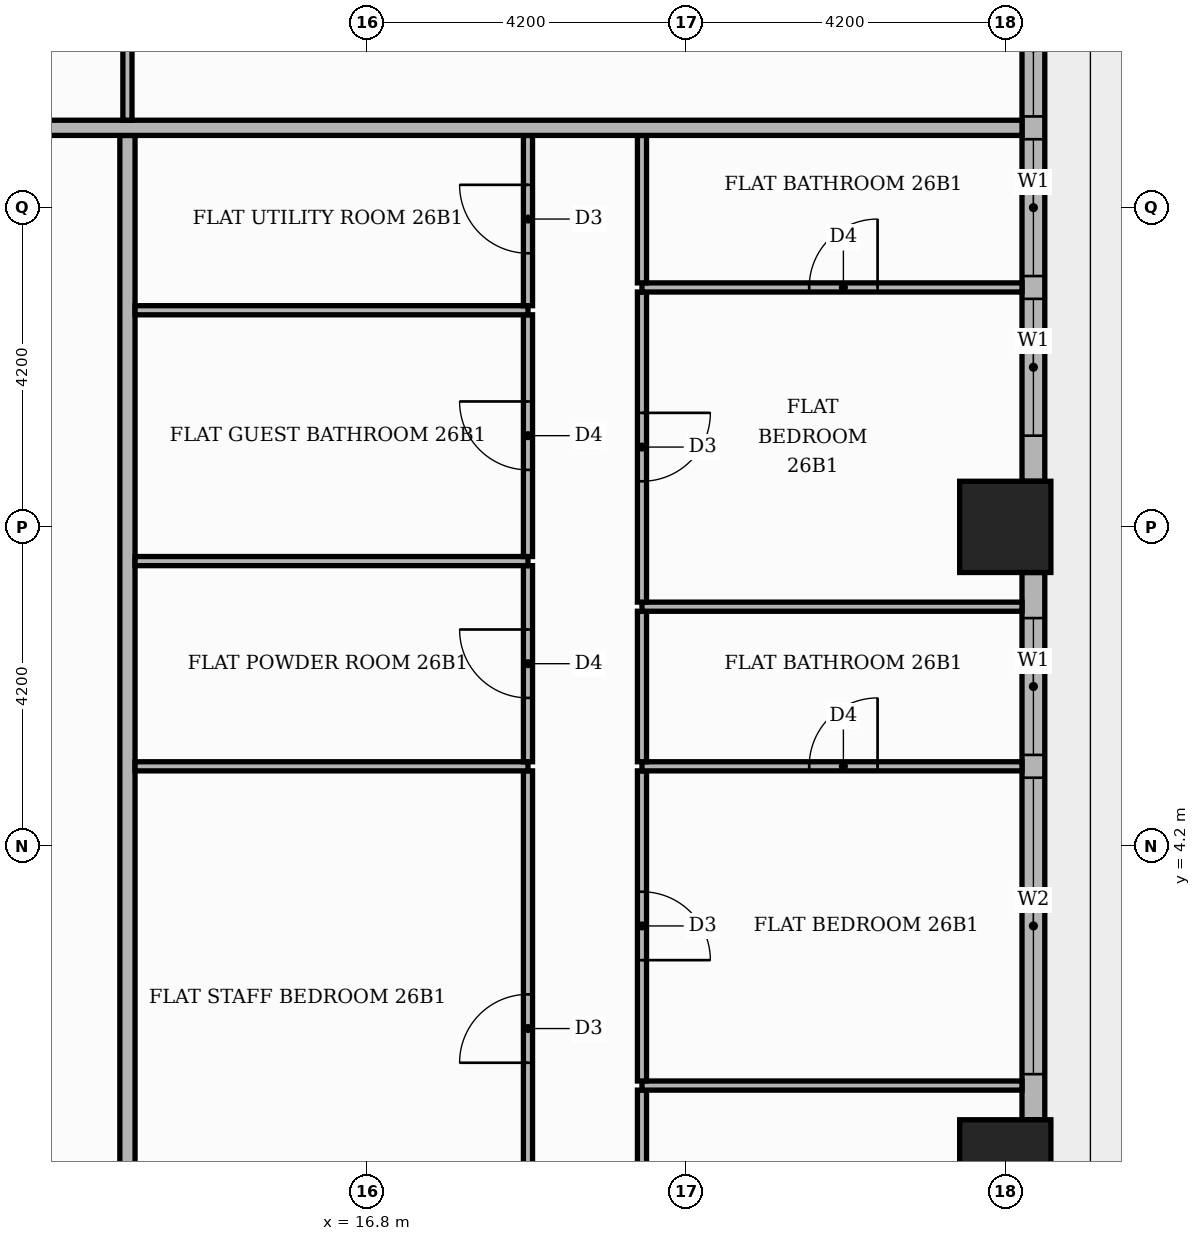
"""IFC4 building model, lengths in metres.
Left out: names, types, materials, properties, quantities, classifications, styles, units other than length and angle.
Written with IfcOpenShell. Run it as: python <this file> out.ifc"""

import sys

from ifc_helpers import new_model, si_unit, direction, frame, frame_2d, origin, origin_2d, place, context, subcontext, project, spatial, rectangle, extrude, element, fill, save


model = new_model("IFC4")
c1 = context("Model", 3, precision=1e-05, world=origin(), true_north=direction((0.0, 1.0)))
c2 = subcontext(c1, "Body", "Model", "MODEL_VIEW")
j1 = project(units=[si_unit("LENGTHUNIT", "METRE"), si_unit("PLANEANGLEUNIT", "RADIAN")], contexts=[c1])
p1 = place(None, origin())
s1 = spatial("IfcSite", under=j1, at=p1, CompositionType="ELEMENT")
p2 = place(p1, origin())
s2 = spatial("IfcBuilding", under=s1, at=p2, CompositionType="ELEMENT")
p3 = place(p2, frame((0.0, 0.0, 110.4)))
s3 = spatial("IfcBuildingStorey", under=s2, at=p3, CompositionType="ELEMENT", Elevation=110.4)
for number, where, z_axis, x_axis in (
    (1, (25.2, 0.0, 0.0), (0.0, 0.0, 1.0), (1.0, 0.0, 0.0)),
    (2, (25.2, 8.4, 0.0), (0.0, 0.0, 1.0), (1.0, 0.0, 0.0)),
):
    element("IfcColumn", number, at=place(p3, frame(where, z_axis=z_axis, x_axis=x_axis)), inside=s3, PredefinedType="COLUMN", context=c2, shape_type="SweptSolid", body=[
        extrude(rectangle(XDim=1.2, YDim=1.2, at=origin_2d()), origin(), (0.0, 0.0, 1.0), 3.9),
    ])
p4 = place(p3, frame((25.57, 0.6, 0.0), z_axis=(0.0, 0.0, 1.0), x_axis=(0.0, 1.0, 0.0)))
e3 = element("IfcWall", 3, at=p4, inside=s3, PredefinedType="STANDARD", context=c2, shape_type="SweptSolid", body=[
    extrude(rectangle(XDim=7.2, YDim=0.3, at=frame_2d((3.6, 0.0))), origin(), (0.0, 0.0, 1.0), 3.48),
])
p5 = place(p4, frame((0.6, 0.0, 0.9)))
e4 = element("IfcOpeningElement", 4, at=p5, cuts=e3, PredefinedType="OPENING", context=c2, shape_type="SweptSolid", body=[
    extrude(rectangle(XDim=3.9, YDim=2.1, at=frame_2d((1.95, 1.05))), frame((0.0, 0.16, 0.0), z_axis=(0.0, -1.0, 0.0), x_axis=(1.0, 0.0, 0.0)), (0.0, 0.0, 1.0), 0.32),
])
p6 = place(p4, frame((4.8, 0.0, 0.9)))
e5 = element("IfcOpeningElement", 5, at=p6, cuts=e3, PredefinedType="OPENING", context=c2, shape_type="SweptSolid", body=[
    extrude(rectangle(XDim=1.8, YDim=2.1, at=frame_2d((0.9, 1.05))), frame((0.0, 0.16, 0.0), z_axis=(0.0, -1.0, 0.0), x_axis=(1.0, 0.0, 0.0)), (0.0, 0.0, 1.0), 0.32),
])
p7 = place(p3, frame((25.57, 9.0, 0.0), z_axis=(0.0, 0.0, 1.0), x_axis=(0.0, 1.0, 0.0)))
e6 = element("IfcWall", 6, at=p7, inside=s3, PredefinedType="STANDARD", context=c2, shape_type="SweptSolid", body=[
    extrude(rectangle(XDim=7.2, YDim=0.3, at=frame_2d((3.6, 0.0))), origin(), (0.0, 0.0, 1.0), 3.48),
])
p8 = place(p7, frame((0.6, 0.0, 0.9)))
e7 = element("IfcOpeningElement", 7, at=p8, cuts=e6, PredefinedType="OPENING", context=c2, shape_type="SweptSolid", body=[
    extrude(rectangle(XDim=1.8, YDim=2.1, at=frame_2d((0.9, 1.05))), frame((0.0, 0.16, 0.0), z_axis=(0.0, -1.0, 0.0), x_axis=(1.0, 0.0, 0.0)), (0.0, 0.0, 1.0), 0.32),
])
p9 = place(p7, frame((2.7, 0.0, 0.9)))
e8 = element("IfcOpeningElement", 8, at=p9, cuts=e6, PredefinedType="OPENING", context=c2, shape_type="SweptSolid", body=[
    extrude(rectangle(XDim=1.8, YDim=2.1, at=frame_2d((0.9, 1.05))), frame((0.0, 0.16, 0.0), z_axis=(0.0, -1.0, 0.0), x_axis=(1.0, 0.0, 0.0)), (0.0, 0.0, 1.0), 0.32),
])
p10 = place(p7, frame((4.8, 0.0, 0.9)))
e9 = element("IfcOpeningElement", 9, at=p10, cuts=e6, PredefinedType="OPENING", context=c2, shape_type="SweptSolid", body=[
    extrude(rectangle(XDim=1.8, YDim=2.1, at=frame_2d((0.9, 1.05))), frame((0.0, 0.16, 0.0), z_axis=(0.0, -1.0, 0.0), x_axis=(1.0, 0.0, 0.0)), (0.0, 0.0, 1.0), 0.32),
])
p11 = place(p3, frame((13.65, -13.55, 0.0), z_axis=(0.0, 0.0, 1.0), x_axis=(0.0, 1.0, 0.0)))
e10 = element("IfcWall", 10, at=p11, inside=s3, PredefinedType="PARTITIONING", context=c2, shape_type="SweptSolid", body=[
    extrude(rectangle(XDim=27.1, YDim=0.2, at=frame_2d((13.55, 0.0))), origin(), (0.0, 0.0, 1.0), 3.48),
])
p12 = place(p11, frame((2.5, 0.0, 0.0)))
e11 = element("IfcOpeningElement", 11, at=p12, cuts=e10, PredefinedType="OPENING", context=c2, shape_type="SweptSolid", body=[
    extrude(rectangle(XDim=1.1, YDim=2.4, at=frame_2d((0.55, 1.2))), frame((0.0, 0.11, 0.0), z_axis=(0.0, -1.0, 0.0), x_axis=(1.0, 0.0, 0.0)), (0.0, 0.0, 1.0), 0.22),
])
p13 = place(p3, frame((20.42, -3.09, 0.0), z_axis=(0.0, 0.0, 1.0), x_axis=(0.0, 1.0, 0.0)))
e12 = element("IfcWall", 12, at=p13, inside=s3, PredefinedType="PARTITIONING", context=c2, shape_type="SweptSolid", body=[
    extrude(rectangle(XDim=4.08, YDim=0.12, at=frame_2d((2.04, 0.0))), origin(), (0.0, 0.0, 1.0), 3.48),
])
p14 = place(p13, frame((1.59, 0.0, 0.0)))
e13 = element("IfcOpeningElement", 13, at=p14, cuts=e12, PredefinedType="OPENING", context=c2, shape_type="SweptSolid", body=[
    extrude(rectangle(XDim=0.9, YDim=2.1, at=frame_2d((0.45, 1.05))), frame((0.0, 0.07, 0.0), z_axis=(0.0, -1.0, 0.0), x_axis=(1.0, 0.0, 0.0)), (0.0, 0.0, 1.0), 0.14),
])
p15 = place(p3, frame((18.92, -1.59, 0.0), z_axis=(0.0, 0.0, 1.0), x_axis=(0.0, 1.0, 0.0)))
e14 = element("IfcWall", 14, at=p15, inside=s3, PredefinedType="PARTITIONING", context=c2, shape_type="SweptSolid", body=[
    extrude(rectangle(XDim=6.78, YDim=0.12, at=frame_2d((3.39, 0.0))), origin(), (0.0, 0.0, 1.0), 3.48),
])
p16 = place(p15, frame((2.94, 0.0, 0.0)))
e15 = element("IfcOpeningElement", 15, at=p16, cuts=e14, PredefinedType="OPENING", context=c2, shape_type="SweptSolid", body=[
    extrude(rectangle(XDim=0.9, YDim=2.1, at=frame_2d((0.45, 1.05))), frame((0.0, 0.07, 0.0), z_axis=(0.0, -1.0, 0.0), x_axis=(1.0, 0.0, 0.0)), (0.0, 0.0, 1.0), 0.14),
])
p17 = place(p3, frame((20.42, 1.05, 0.0), z_axis=(0.0, 0.0, 1.0), x_axis=(1.0, 0.0, 0.0)))
e16 = element("IfcWall", 16, at=p17, inside=s3, PredefinedType="PARTITIONING", context=c2, shape_type="SweptSolid", body=[
    extrude(rectangle(XDim=5.0, YDim=0.12, at=frame_2d((2.5, 0.0))), origin(), (0.0, 0.0, 1.0), 3.48),
])
p18 = place(p3, frame((20.42, 1.11, 0.0), z_axis=(0.0, 0.0, 1.0), x_axis=(0.0, 1.0, 0.0)))
e17 = element("IfcWall", 17, at=p18, inside=s3, PredefinedType="PARTITIONING", context=c2, shape_type="SweptSolid", body=[
    extrude(rectangle(XDim=4.08, YDim=0.12, at=frame_2d((2.04, 0.0))), origin(), (0.0, 0.0, 1.0), 3.48),
])
p19 = place(p18, frame((1.59, 0.0, 0.0)))
e18 = element("IfcOpeningElement", 18, at=p19, cuts=e17, PredefinedType="OPENING", context=c2, shape_type="SweptSolid", body=[
    extrude(rectangle(XDim=0.9, YDim=2.1, at=frame_2d((0.45, 1.05))), frame((0.0, 0.07, 0.0), z_axis=(0.0, -1.0, 0.0), x_axis=(1.0, 0.0, 0.0)), (0.0, 0.0, 1.0), 0.14),
])
p20 = place(p3, frame((13.75, 5.25, 0.0), z_axis=(0.0, 0.0, 1.0), x_axis=(1.0, 0.0, 0.0)))
e19 = element("IfcWall", 19, at=p20, inside=s3, PredefinedType="PARTITIONING", context=c2, shape_type="SweptSolid", body=[
    extrude(rectangle(XDim=5.17, YDim=0.12, at=frame_2d((2.585, 0.0))), origin(), (0.0, 0.0, 1.0), 3.48),
])
p21 = place(p3, frame((20.42, 5.25, 0.0), z_axis=(0.0, 0.0, 1.0), x_axis=(1.0, 0.0, 0.0)))
e20 = element("IfcWall", 20, at=p21, inside=s3, PredefinedType="PARTITIONING", context=c2, shape_type="SweptSolid", body=[
    extrude(rectangle(XDim=5.0, YDim=0.12, at=frame_2d((2.5, 0.0))), origin(), (0.0, 0.0, 1.0), 3.48),
])
p22 = place(p21, frame((2.2, 0.0, 0.0)))
e21 = element("IfcOpeningElement", 21, at=p22, cuts=e20, PredefinedType="OPENING", context=c2, shape_type="SweptSolid", body=[
    extrude(rectangle(XDim=0.9, YDim=2.1, at=frame_2d((0.45, 1.05))), frame((0.0, 0.07, 0.0), z_axis=(0.0, -1.0, 0.0), x_axis=(1.0, 0.0, 0.0)), (0.0, 0.0, 1.0), 0.14),
])
p23 = place(p3, frame((18.92, 5.31, 0.0), z_axis=(0.0, 0.0, 1.0), x_axis=(0.0, 1.0, 0.0)))
e22 = element("IfcWall", 22, at=p23, inside=s3, PredefinedType="PARTITIONING", context=c2, shape_type="SweptSolid", body=[
    extrude(rectangle(XDim=2.58, YDim=0.12, at=frame_2d((1.29, 0.0))), origin(), (0.0, 0.0, 1.0), 3.48),
])
p24 = place(p23, frame((0.84, 0.0, 0.0)))
e23 = element("IfcOpeningElement", 23, at=p24, cuts=e22, PredefinedType="OPENING", context=c2, shape_type="SweptSolid", body=[
    extrude(rectangle(XDim=0.9, YDim=2.1, at=frame_2d((0.45, 1.05))), frame((0.0, 0.07, 0.0), z_axis=(0.0, -1.0, 0.0), x_axis=(1.0, 0.0, 0.0)), (0.0, 0.0, 1.0), 0.14),
])
p25 = place(p3, frame((20.42, 5.31, 0.0), z_axis=(0.0, 0.0, 1.0), x_axis=(0.0, 1.0, 0.0)))
e24 = element("IfcWall", 24, at=p25, inside=s3, PredefinedType="PARTITIONING", context=c2, shape_type="SweptSolid", body=[
    extrude(rectangle(XDim=1.98, YDim=0.12, at=frame_2d((0.99, 0.0))), origin(), (0.0, 0.0, 1.0), 3.48),
])
p26 = place(p3, frame((20.42, 7.35, 0.0), z_axis=(0.0, 0.0, 1.0), x_axis=(1.0, 0.0, 0.0)))
e25 = element("IfcWall", 25, at=p26, inside=s3, PredefinedType="PARTITIONING", context=c2, shape_type="SweptSolid", body=[
    extrude(rectangle(XDim=5.0, YDim=0.12, at=frame_2d((2.5, 0.0))), origin(), (0.0, 0.0, 1.0), 3.48),
])
p27 = place(p3, frame((20.42, 7.41, 0.0), z_axis=(0.0, 0.0, 1.0), x_axis=(0.0, 1.0, 0.0)))
e26 = element("IfcWall", 26, at=p27, inside=s3, PredefinedType="PARTITIONING", context=c2, shape_type="SweptSolid", body=[
    extrude(rectangle(XDim=4.08, YDim=0.12, at=frame_2d((2.04, 0.0))), origin(), (0.0, 0.0, 1.0), 3.48),
])
p28 = place(p27, frame((1.59, 0.0, 0.0)))
e27 = element("IfcOpeningElement", 27, at=p28, cuts=e26, PredefinedType="OPENING", context=c2, shape_type="SweptSolid", body=[
    extrude(rectangle(XDim=0.9, YDim=2.1, at=frame_2d((0.45, 1.05))), frame((0.0, 0.07, 0.0), z_axis=(0.0, -1.0, 0.0), x_axis=(1.0, 0.0, 0.0)), (0.0, 0.0, 1.0), 0.14),
])
p29 = place(p3, frame((13.75, 7.95, 0.0), z_axis=(0.0, 0.0, 1.0), x_axis=(1.0, 0.0, 0.0)))
e28 = element("IfcWall", 28, at=p29, inside=s3, PredefinedType="PARTITIONING", context=c2, shape_type="SweptSolid", body=[
    extrude(rectangle(XDim=5.17, YDim=0.12, at=frame_2d((2.585, 0.0))), origin(), (0.0, 0.0, 1.0), 3.48),
])
p30 = place(p3, frame((18.92, 8.01, 0.0), z_axis=(0.0, 0.0, 1.0), x_axis=(0.0, 1.0, 0.0)))
e29 = element("IfcWall", 29, at=p30, inside=s3, PredefinedType="PARTITIONING", context=c2, shape_type="SweptSolid", body=[
    extrude(rectangle(XDim=3.18, YDim=0.12, at=frame_2d((1.59, 0.0))), origin(), (0.0, 0.0, 1.0), 3.48),
])
p31 = place(p30, frame((1.14, 0.0, 0.0)))
e30 = element("IfcOpeningElement", 30, at=p31, cuts=e29, PredefinedType="OPENING", context=c2, shape_type="SweptSolid", body=[
    extrude(rectangle(XDim=0.9, YDim=2.1, at=frame_2d((0.45, 1.05))), frame((0.0, 0.07, 0.0), z_axis=(0.0, -1.0, 0.0), x_axis=(1.0, 0.0, 0.0)), (0.0, 0.0, 1.0), 0.14),
])
p32 = place(p3, frame((13.75, 11.25, 0.0), z_axis=(0.0, 0.0, 1.0), x_axis=(1.0, 0.0, 0.0)))
e31 = element("IfcWall", 31, at=p32, inside=s3, PredefinedType="PARTITIONING", context=c2, shape_type="SweptSolid", body=[
    extrude(rectangle(XDim=5.17, YDim=0.12, at=frame_2d((2.585, 0.0))), origin(), (0.0, 0.0, 1.0), 3.48),
])
p33 = place(p3, frame((18.92, 11.31, 0.0), z_axis=(0.0, 0.0, 1.0), x_axis=(0.0, 1.0, 0.0)))
e32 = element("IfcWall", 32, at=p33, inside=s3, PredefinedType="PARTITIONING", context=c2, shape_type="SweptSolid", body=[
    extrude(rectangle(XDim=2.24, YDim=0.12, at=frame_2d((1.12, 0.0))), origin(), (0.0, 0.0, 1.0), 3.48),
])
p34 = place(p33, frame((0.69, 0.0, 0.0)))
e33 = element("IfcOpeningElement", 33, at=p34, cuts=e32, PredefinedType="OPENING", context=c2, shape_type="SweptSolid", body=[
    extrude(rectangle(XDim=0.9, YDim=2.1, at=frame_2d((0.45, 1.05))), frame((0.0, 0.07, 0.0), z_axis=(0.0, -1.0, 0.0), x_axis=(1.0, 0.0, 0.0)), (0.0, 0.0, 1.0), 0.14),
])
p35 = place(p3, frame((20.42, 11.55, 0.0), z_axis=(0.0, 0.0, 1.0), x_axis=(1.0, 0.0, 0.0)))
e34 = element("IfcWall", 34, at=p35, inside=s3, PredefinedType="PARTITIONING", context=c2, shape_type="SweptSolid", body=[
    extrude(rectangle(XDim=5.0, YDim=0.12, at=frame_2d((2.5, 0.0))), origin(), (0.0, 0.0, 1.0), 3.48),
])
p36 = place(p35, frame((2.2, 0.0, 0.0)))
e35 = element("IfcOpeningElement", 35, at=p36, cuts=e34, PredefinedType="OPENING", context=c2, shape_type="SweptSolid", body=[
    extrude(rectangle(XDim=0.9, YDim=2.1, at=frame_2d((0.45, 1.05))), frame((0.0, 0.07, 0.0), z_axis=(0.0, -1.0, 0.0), x_axis=(1.0, 0.0, 0.0)), (0.0, 0.0, 1.0), 0.14),
])
p37 = place(p3, frame((20.42, 11.61, 0.0), z_axis=(0.0, 0.0, 1.0), x_axis=(0.0, 1.0, 0.0)))
e36 = element("IfcWall", 36, at=p37, inside=s3, PredefinedType="PARTITIONING", context=c2, shape_type="SweptSolid", body=[
    extrude(rectangle(XDim=1.94, YDim=0.12, at=frame_2d((0.97, 0.0))), origin(), (0.0, 0.0, 1.0), 3.48),
])
p38 = place(p3, frame((-13.65, 13.65, 0.0), z_axis=(0.0, 0.0, 1.0), x_axis=(1.0, 0.0, 0.0)))
e37 = element("IfcWall", 37, at=p38, inside=s3, PredefinedType="PARTITIONING", context=c2, shape_type="SweptSolid", body=[
    extrude(rectangle(XDim=39.07, YDim=0.2, at=frame_2d((19.535, 0.0))), origin(), (0.0, 0.0, 1.0), 3.48),
])
p39 = place(p38, frame((23.6, 0.0, 0.0)))
e38 = element("IfcOpeningElement", 38, at=p39, cuts=e37, PredefinedType="OPENING", context=c2, shape_type="SweptSolid", body=[
    extrude(rectangle(XDim=1.1, YDim=2.4, at=frame_2d((0.55, 1.2))), frame((0.0, 0.11, 0.0), z_axis=(0.0, -1.0, 0.0), x_axis=(1.0, 0.0, 0.0)), (0.0, 0.0, 1.0), 0.22),
])
p40 = place(p3, frame((13.65, 13.75, 0.0), z_axis=(0.0, 0.0, 1.0), x_axis=(0.0, 1.0, 0.0)))
e39 = element("IfcWall", 39, at=p40, inside=s3, PredefinedType="PARTITIONING", context=c2, shape_type="SweptSolid", body=[
    extrude(rectangle(XDim=6.01, YDim=0.12, at=frame_2d((3.005, 0.0))), origin(), (0.0, 0.0, 1.0), 3.48),
])
p41 = place(p40, frame((2.535, 0.0, 0.0)))
e40 = element("IfcOpeningElement", 40, at=p41, cuts=e39, PredefinedType="OPENING", context=c2, shape_type="SweptSolid", body=[
    extrude(rectangle(XDim=0.9, YDim=2.1, at=frame_2d((0.45, 1.05))), frame((0.0, 0.07, 0.0), z_axis=(0.0, -1.0, 0.0), x_axis=(1.0, 0.0, 0.0)), (0.0, 0.0, 1.0), 0.14),
])
p42 = place(p5, origin())
e41 = element("IfcWindow", 41, at=p42, inside=s3, PartitioningType="SINGLE_PANEL", PredefinedType="WINDOW", context=c2, shape_type="SweptSolid", body=[
    extrude(rectangle(XDim=3.9, YDim=2.1, at=frame_2d((1.95, 1.05))), frame((0.0, 0.03, 0.0), z_axis=(0.0, -1.0, 0.0), x_axis=(1.0, 0.0, 0.0)), (0.0, 0.0, 1.0), 0.06),
])
fill(e4, e41)
p43 = place(p6, origin())
e42 = element("IfcWindow", 42, at=p43, inside=s3, PartitioningType="SINGLE_PANEL", PredefinedType="WINDOW", context=c2, shape_type="SweptSolid", body=[
    extrude(rectangle(XDim=1.8, YDim=2.1, at=frame_2d((0.9, 1.05))), frame((0.0, 0.03, 0.0), z_axis=(0.0, -1.0, 0.0), x_axis=(1.0, 0.0, 0.0)), (0.0, 0.0, 1.0), 0.06),
])
fill(e5, e42)
p44 = place(p8, origin())
e43 = element("IfcWindow", 43, at=p44, inside=s3, PartitioningType="SINGLE_PANEL", PredefinedType="WINDOW", context=c2, shape_type="SweptSolid", body=[
    extrude(rectangle(XDim=1.8, YDim=2.1, at=frame_2d((0.9, 1.05))), frame((0.0, 0.03, 0.0), z_axis=(0.0, -1.0, 0.0), x_axis=(1.0, 0.0, 0.0)), (0.0, 0.0, 1.0), 0.06),
])
fill(e7, e43)
p45 = place(p9, origin())
e44 = element("IfcWindow", 44, at=p45, inside=s3, PartitioningType="SINGLE_PANEL", PredefinedType="WINDOW", context=c2, shape_type="SweptSolid", body=[
    extrude(rectangle(XDim=1.8, YDim=2.1, at=frame_2d((0.9, 1.05))), frame((0.0, 0.03, 0.0), z_axis=(0.0, -1.0, 0.0), x_axis=(1.0, 0.0, 0.0)), (0.0, 0.0, 1.0), 0.06),
])
fill(e8, e44)
p46 = place(p10, origin())
e45 = element("IfcWindow", 45, at=p46, inside=s3, PartitioningType="SINGLE_PANEL", PredefinedType="WINDOW", context=c2, shape_type="SweptSolid", body=[
    extrude(rectangle(XDim=1.8, YDim=2.1, at=frame_2d((0.9, 1.05))), frame((0.0, 0.03, 0.0), z_axis=(0.0, -1.0, 0.0), x_axis=(1.0, 0.0, 0.0)), (0.0, 0.0, 1.0), 0.06),
])
fill(e9, e45)
p47 = place(p16, origin())
e46 = element("IfcDoor", 46, at=p47, inside=s3, OperationType="SINGLE_SWING_LEFT", PredefinedType="DOOR", context=c2, shape_type="SweptSolid", body=[
    extrude(rectangle(XDim=0.9, YDim=2.1, at=frame_2d((0.45, 1.05))), frame((0.0, 0.025, 0.0), z_axis=(0.0, -1.0, 0.0), x_axis=(1.0, 0.0, 0.0)), (0.0, 0.0, 1.0), 0.05),
])
fill(e15, e46)
p48 = place(p24, origin())
e47 = element("IfcDoor", 47, at=p48, inside=s3, OperationType="SINGLE_SWING_RIGHT", PredefinedType="DOOR", context=c2, shape_type="SweptSolid", body=[
    extrude(rectangle(XDim=0.9, YDim=2.1, at=frame_2d((0.45, 1.05))), frame((0.0, 0.025, 0.0), z_axis=(0.0, -1.0, 0.0), x_axis=(1.0, 0.0, 0.0)), (0.0, 0.0, 1.0), 0.05),
])
fill(e23, e47)
p49 = place(p31, origin())
e48 = element("IfcDoor", 48, at=p49, inside=s3, OperationType="SINGLE_SWING_RIGHT", PredefinedType="DOOR", context=c2, shape_type="SweptSolid", body=[
    extrude(rectangle(XDim=0.9, YDim=2.1, at=frame_2d((0.45, 1.05))), frame((0.0, 0.025, 0.0), z_axis=(0.0, -1.0, 0.0), x_axis=(1.0, 0.0, 0.0)), (0.0, 0.0, 1.0), 0.05),
])
fill(e30, e48)
p50 = place(p34, origin())
e49 = element("IfcDoor", 49, at=p50, inside=s3, OperationType="SINGLE_SWING_RIGHT", PredefinedType="DOOR", context=c2, shape_type="SweptSolid", body=[
    extrude(rectangle(XDim=0.9, YDim=2.1, at=frame_2d((0.45, 1.05))), frame((0.0, 0.025, 0.0), z_axis=(0.0, -1.0, 0.0), x_axis=(1.0, 0.0, 0.0)), (0.0, 0.0, 1.0), 0.05),
])
fill(e33, e49)
p51 = place(p19, frame((0.9, 0.0, 0.0), z_axis=(0.0, 0.0, 1.0), x_axis=(-1.0, 0.0, 0.0)))
e50 = element("IfcDoor", 50, at=p51, inside=s3, OperationType="SINGLE_SWING_LEFT", PredefinedType="DOOR", context=c2, shape_type="SweptSolid", body=[
    extrude(rectangle(XDim=0.9, YDim=2.1, at=frame_2d((0.45, 1.05))), frame((0.0, 0.025, 0.0), z_axis=(0.0, -1.0, 0.0), x_axis=(1.0, 0.0, 0.0)), (0.0, 0.0, 1.0), 0.05),
])
fill(e18, e50)
p52 = place(p22, origin())
e51 = element("IfcDoor", 51, at=p52, inside=s3, OperationType="SINGLE_SWING_RIGHT", PredefinedType="DOOR", context=c2, shape_type="SweptSolid", body=[
    extrude(rectangle(XDim=0.9, YDim=2.1, at=frame_2d((0.45, 1.05))), frame((0.0, 0.025, 0.0), z_axis=(0.0, -1.0, 0.0), x_axis=(1.0, 0.0, 0.0)), (0.0, 0.0, 1.0), 0.05),
])
fill(e21, e51)
p53 = place(p28, frame((0.9, 0.0, 0.0), z_axis=(0.0, 0.0, 1.0), x_axis=(-1.0, 0.0, 0.0)))
e52 = element("IfcDoor", 52, at=p53, inside=s3, OperationType="SINGLE_SWING_RIGHT", PredefinedType="DOOR", context=c2, shape_type="SweptSolid", body=[
    extrude(rectangle(XDim=0.9, YDim=2.1, at=frame_2d((0.45, 1.05))), frame((0.0, 0.025, 0.0), z_axis=(0.0, -1.0, 0.0), x_axis=(1.0, 0.0, 0.0)), (0.0, 0.0, 1.0), 0.05),
])
fill(e27, e52)
p54 = place(p36, origin())
e53 = element("IfcDoor", 53, at=p54, inside=s3, OperationType="SINGLE_SWING_RIGHT", PredefinedType="DOOR", context=c2, shape_type="SweptSolid", body=[
    extrude(rectangle(XDim=0.9, YDim=2.1, at=frame_2d((0.45, 1.05))), frame((0.0, 0.025, 0.0), z_axis=(0.0, -1.0, 0.0), x_axis=(1.0, 0.0, 0.0)), (0.0, 0.0, 1.0), 0.05),
])
fill(e35, e53)
save(model, sys.argv[1])
